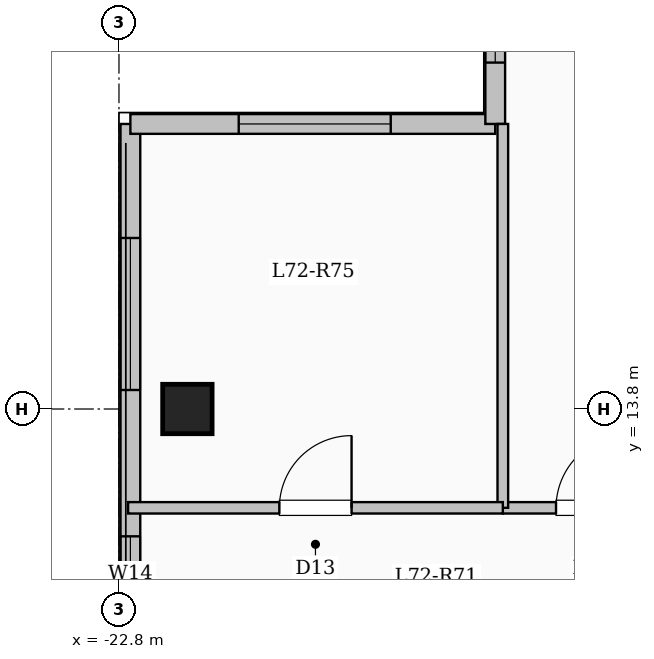
"""IFC4 building model, lengths in metres.
Left out: names, types, materials, properties, quantities, classifications, styles, units other than length and angle.
Written with IfcOpenShell. Run it as: python <this file> out.ifc"""

import sys

from ifc_helpers import new_model, si_unit, direction, frame, frame_2d, origin, origin_2d, place, context, subcontext, project, spatial, rectangle, extrude, element, fill, save


model = new_model("IFC4")
c1 = context("Model", 3, precision=1e-05, world=origin(), true_north=direction((0.0, 1.0)))
c2 = subcontext(c1, "Body", "Model", "MODEL_VIEW")
j1 = project(units=[si_unit("LENGTHUNIT", "METRE"), si_unit("PLANEANGLEUNIT", "RADIAN")], contexts=[c1])
p1 = place(None, origin())
s1 = spatial("IfcSite", under=j1, at=p1, CompositionType="ELEMENT")
p2 = place(p1, origin())
s2 = spatial("IfcBuilding", under=s1, at=p2, CompositionType="ELEMENT")
p3 = place(p2, frame((0.0, 0.0, 264.95)))
s3 = spatial("IfcBuildingStorey", under=s2, at=p3, CompositionType="ELEMENT", Elevation=264.95)
p4 = place(p3, frame((-21.9, 13.8, 0.0), z_axis=(0.0, 0.0, 1.0), x_axis=(1.0, 0.0, 0.0)))
e1 = element("IfcColumn", 1, at=p4, inside=s3, PredefinedType="COLUMN", context=c2, shape_type="SweptSolid", body=[
    extrude(rectangle(XDim=0.65, YDim=0.65, at=origin_2d()), origin(), (0.0, 0.0, 1.0), 3.35),
])
p5 = place(p3, frame((-22.65, -17.55, 0.0), z_axis=(0.0, 0.0, 1.0), x_axis=(0.0, 1.0, 0.0)))
e2 = element("IfcWall", 2, at=p5, inside=s3, PredefinedType="SOLIDWALL", context=c2, shape_type="SweptSolid", body=[
    extrude(rectangle(XDim=35.1, YDim=0.26, at=frame_2d((17.55, 0.0))), origin(), (0.0, 0.0, 1.0), 3.1),
])
p6 = place(p5, frame((2.975, 0.0, 0.9)))
e3 = element("IfcOpeningElement", 3, at=p6, cuts=e2, PredefinedType="OPENING", context=c2, shape_type="SweptSolid", body=[
    extrude(rectangle(XDim=2.2, YDim=1.75, at=frame_2d((1.1, 0.875))), frame((0.0, 0.14, 0.0), z_axis=(0.0, -1.0, 0.0), x_axis=(1.0, 0.0, 0.0)), (0.0, 0.0, 1.0), 0.28),
])
p7 = place(p5, frame((8.625, 0.0, 0.95)))
e4 = element("IfcOpeningElement", 4, at=p7, cuts=e2, PredefinedType="OPENING", context=c2, shape_type="SweptSolid", body=[
    extrude(rectangle(XDim=1.2, YDim=1.5, at=frame_2d((0.6, 0.75))), frame((0.0, 0.14, 0.0), z_axis=(0.0, -1.0, 0.0), x_axis=(1.0, 0.0, 0.0)), (0.0, 0.0, 1.0), 0.28),
])
p8 = place(p5, frame((18.3, 0.0, 0.9)))
e5 = element("IfcOpeningElement", 5, at=p8, cuts=e2, PredefinedType="OPENING", context=c2, shape_type="SweptSolid", body=[
    extrude(rectangle(XDim=2.0, YDim=1.7, at=frame_2d((1.0, 0.85))), frame((0.0, 0.14, 0.0), z_axis=(0.0, -1.0, 0.0), x_axis=(1.0, 0.0, 0.0)), (0.0, 0.0, 1.0), 0.28),
])
p9 = place(p5, frame((28.675, 0.0, 0.95)))
e6 = element("IfcOpeningElement", 6, at=p9, cuts=e2, PredefinedType="OPENING", context=c2, shape_type="SweptSolid", body=[
    extrude(rectangle(XDim=1.0, YDim=1.5, at=frame_2d((0.5, 0.75))), frame((0.0, 0.14, 0.0), z_axis=(0.0, -1.0, 0.0), x_axis=(1.0, 0.0, 0.0)), (0.0, 0.0, 1.0), 0.28),
])
p10 = place(p5, frame((31.6, 0.0, 0.9)))
e7 = element("IfcOpeningElement", 7, at=p10, cuts=e2, PredefinedType="OPENING", context=c2, shape_type="SweptSolid", body=[
    extrude(rectangle(XDim=2.0, YDim=1.7, at=frame_2d((1.0, 0.85))), frame((0.0, 0.14, 0.0), z_axis=(0.0, -1.0, 0.0), x_axis=(1.0, 0.0, 0.0)), (0.0, 0.0, 1.0), 0.28),
])
p11 = place(p3, frame((-22.65, 17.55, 0.0), z_axis=(0.0, 0.0, 1.0), x_axis=(1.0, 0.0, 0.0)))
e8 = element("IfcWall", 8, at=p11, inside=s3, PredefinedType="SOLIDWALL", context=c2, shape_type="SweptSolid", body=[
    extrude(rectangle(XDim=4.8, YDim=0.26, at=frame_2d((2.4, 0.0))), origin(), (0.0, 0.0, 1.0), 3.1),
])
p12 = place(p11, frame((1.425, 0.0, 0.9)))
e9 = element("IfcOpeningElement", 9, at=p12, cuts=e8, PredefinedType="OPENING", context=c2, shape_type="SweptSolid", body=[
    extrude(rectangle(XDim=2.0, YDim=1.7, at=frame_2d((1.0, 0.85))), frame((0.0, 0.14, 0.0), z_axis=(0.0, -1.0, 0.0), x_axis=(1.0, 0.0, 0.0)), (0.0, 0.0, 1.0), 0.28),
])
p13 = place(p3, frame((-17.85, 17.55, 0.0), z_axis=(0.0, 0.0, 1.0), x_axis=(0.0, 1.0, 0.0)))
e10 = element("IfcWall", 10, at=p13, inside=s3, PredefinedType="SOLIDWALL", context=c2, shape_type="SweptSolid", body=[
    extrude(rectangle(XDim=3.3, YDim=0.26, at=frame_2d((1.65, 0.0))), origin(), (0.0, 0.0, 1.0), 3.1),
])
p14 = place(p13, frame((0.808, 0.0, 0.9)))
e11 = element("IfcOpeningElement", 11, at=p14, cuts=e10, PredefinedType="OPENING", context=c2, shape_type="SweptSolid", body=[
    extrude(rectangle(XDim=1.65, YDim=1.6, at=frame_2d((0.825, 0.8))), frame((0.0, 0.14, 0.0), z_axis=(0.0, -1.0, 0.0), x_axis=(1.0, 0.0, 0.0)), (0.0, 0.0, 1.0), 0.28),
])
p15 = place(p3, frame((-17.75, 12.5, 0.0), z_axis=(0.0, 0.0, 1.0), x_axis=(1.0, 0.0, 0.0)))
e12 = element("IfcWall", 12, at=p15, inside=s3, PredefinedType="PARTITIONING", context=c2, shape_type="SweptSolid", body=[
    extrude(rectangle(XDim=13.9, YDim=0.15, at=frame_2d((6.95, 0.0))), origin(), (0.0, 0.0, 1.0), 3.1),
])
p16 = place(p15, frame((0.7, 0.0, 0.0)))
e13 = element("IfcOpeningElement", 13, at=p16, cuts=e12, PredefinedType="OPENING", context=c2, shape_type="SweptSolid", body=[
    extrude(rectangle(XDim=0.96, YDim=2.15, at=frame_2d((0.48, 1.075))), frame((0.0, 0.085, 0.0), z_axis=(0.0, -1.0, 0.0), x_axis=(1.0, 0.0, 0.0)), (0.0, 0.0, 1.0), 0.17),
])
p17 = place(p15, frame((7.105, 0.0, 0.0)))
e14 = element("IfcOpeningElement", 14, at=p17, cuts=e12, PredefinedType="OPENING", context=c2, shape_type="SweptSolid", body=[
    extrude(rectangle(XDim=0.96, YDim=2.15, at=frame_2d((0.48, 1.075))), frame((0.0, 0.085, 0.0), z_axis=(0.0, -1.0, 0.0), x_axis=(1.0, 0.0, 0.0)), (0.0, 0.0, 1.0), 0.17),
])
p18 = place(p15, frame((12.57, 0.0, 0.0)))
e15 = element("IfcOpeningElement", 15, at=p18, cuts=e12, PredefinedType="OPENING", context=c2, shape_type="SweptSolid", body=[
    extrude(rectangle(XDim=0.96, YDim=2.15, at=frame_2d((0.48, 1.075))), frame((0.0, 0.085, 0.0), z_axis=(0.0, -1.0, 0.0), x_axis=(1.0, 0.0, 0.0)), (0.0, 0.0, 1.0), 0.17),
])
p19 = place(p3, frame((-17.75, 12.5, 0.0), z_axis=(0.0, 0.0, 1.0), x_axis=(0.0, 1.0, 0.0)))
e16 = element("IfcWall", 16, at=p19, inside=s3, PredefinedType="PARTITIONING", context=c2, shape_type="SweptSolid", body=[
    extrude(rectangle(XDim=5.05, YDim=0.14, at=frame_2d((2.525, 0.0))), origin(), (0.0, 0.0, 1.0), 3.1),
])
p20 = place(p3, frame((-22.68, 12.5, 0.0), z_axis=(0.0, 0.0, 1.0), x_axis=(1.0, 0.0, 0.0)))
e17 = element("IfcWall", 17, at=p20, inside=s3, PredefinedType="PARTITIONING", context=c2, shape_type="SweptSolid", body=[
    extrude(rectangle(XDim=4.93, YDim=0.15, at=frame_2d((2.465, 0.0))), origin(), (0.0, 0.0, 1.0), 3.1),
])
p21 = place(p20, frame((1.99, 0.0, 0.0)))
e18 = element("IfcOpeningElement", 18, at=p21, cuts=e17, PredefinedType="OPENING", context=c2, shape_type="SweptSolid", body=[
    extrude(rectangle(XDim=0.95, YDim=2.15, at=frame_2d((0.475, 1.075))), frame((0.0, 0.085, 0.0), z_axis=(0.0, -1.0, 0.0), x_axis=(1.0, 0.0, 0.0)), (0.0, 0.0, 1.0), 0.17),
])
p22 = place(p9, origin())
e19 = element("IfcWindow", 19, at=p22, inside=s3, PartitioningType="SINGLE_PANEL", PredefinedType="WINDOW", context=c2, shape_type="SweptSolid", body=[
    extrude(rectangle(XDim=1.0, YDim=1.5, at=frame_2d((0.5, 0.75))), frame((0.0, 0.03, 0.0), z_axis=(0.0, -1.0, 0.0), x_axis=(1.0, 0.0, 0.0)), (0.0, 0.0, 1.0), 0.06),
])
fill(e6, e19)
p23 = place(p10, origin())
e20 = element("IfcWindow", 20, at=p23, inside=s3, PartitioningType="SINGLE_PANEL", PredefinedType="WINDOW", context=c2, shape_type="SweptSolid", body=[
    extrude(rectangle(XDim=2.0, YDim=1.7, at=frame_2d((1.0, 0.85))), frame((0.0, 0.03, 0.0), z_axis=(0.0, -1.0, 0.0), x_axis=(1.0, 0.0, 0.0)), (0.0, 0.0, 1.0), 0.06),
])
fill(e7, e20)
p24 = place(p12, origin())
e21 = element("IfcWindow", 21, at=p24, inside=s3, PartitioningType="SINGLE_PANEL", PredefinedType="WINDOW", context=c2, shape_type="SweptSolid", body=[
    extrude(rectangle(XDim=2.0, YDim=1.7, at=frame_2d((1.0, 0.85))), frame((0.0, 0.03, 0.0), z_axis=(0.0, -1.0, 0.0), x_axis=(1.0, 0.0, 0.0)), (0.0, 0.0, 1.0), 0.06),
])
fill(e9, e21)
p25 = place(p14, origin())
e22 = element("IfcWindow", 22, at=p25, inside=s3, PartitioningType="SINGLE_PANEL", PredefinedType="WINDOW", context=c2, shape_type="SweptSolid", body=[
    extrude(rectangle(XDim=1.65, YDim=1.6, at=frame_2d((0.825, 0.8))), frame((0.0, 0.03, 0.0), z_axis=(0.0, -1.0, 0.0), x_axis=(1.0, 0.0, 0.0)), (0.0, 0.0, 1.0), 0.06),
])
fill(e11, e22)
p26 = place(p16, origin())
e23 = element("IfcDoor", 23, at=p26, inside=s3, OperationType="SINGLE_SWING_RIGHT", PredefinedType="DOOR", context=c2, shape_type="SweptSolid", body=[
    extrude(rectangle(XDim=0.96, YDim=2.15, at=frame_2d((0.48, 1.075))), frame((0.0, 0.025, 0.0), z_axis=(0.0, -1.0, 0.0), x_axis=(1.0, 0.0, 0.0)), (0.0, 0.0, 1.0), 0.05),
])
fill(e13, e23)
p27 = place(p21, origin())
e24 = element("IfcDoor", 24, at=p27, inside=s3, OperationType="SINGLE_SWING_RIGHT", PredefinedType="DOOR", context=c2, shape_type="SweptSolid", body=[
    extrude(rectangle(XDim=0.95, YDim=2.15, at=frame_2d((0.475, 1.075))), frame((0.0, 0.025, 0.0), z_axis=(0.0, -1.0, 0.0), x_axis=(1.0, 0.0, 0.0)), (0.0, 0.0, 1.0), 0.05),
])
fill(e18, e24)
save(model, sys.argv[1])
